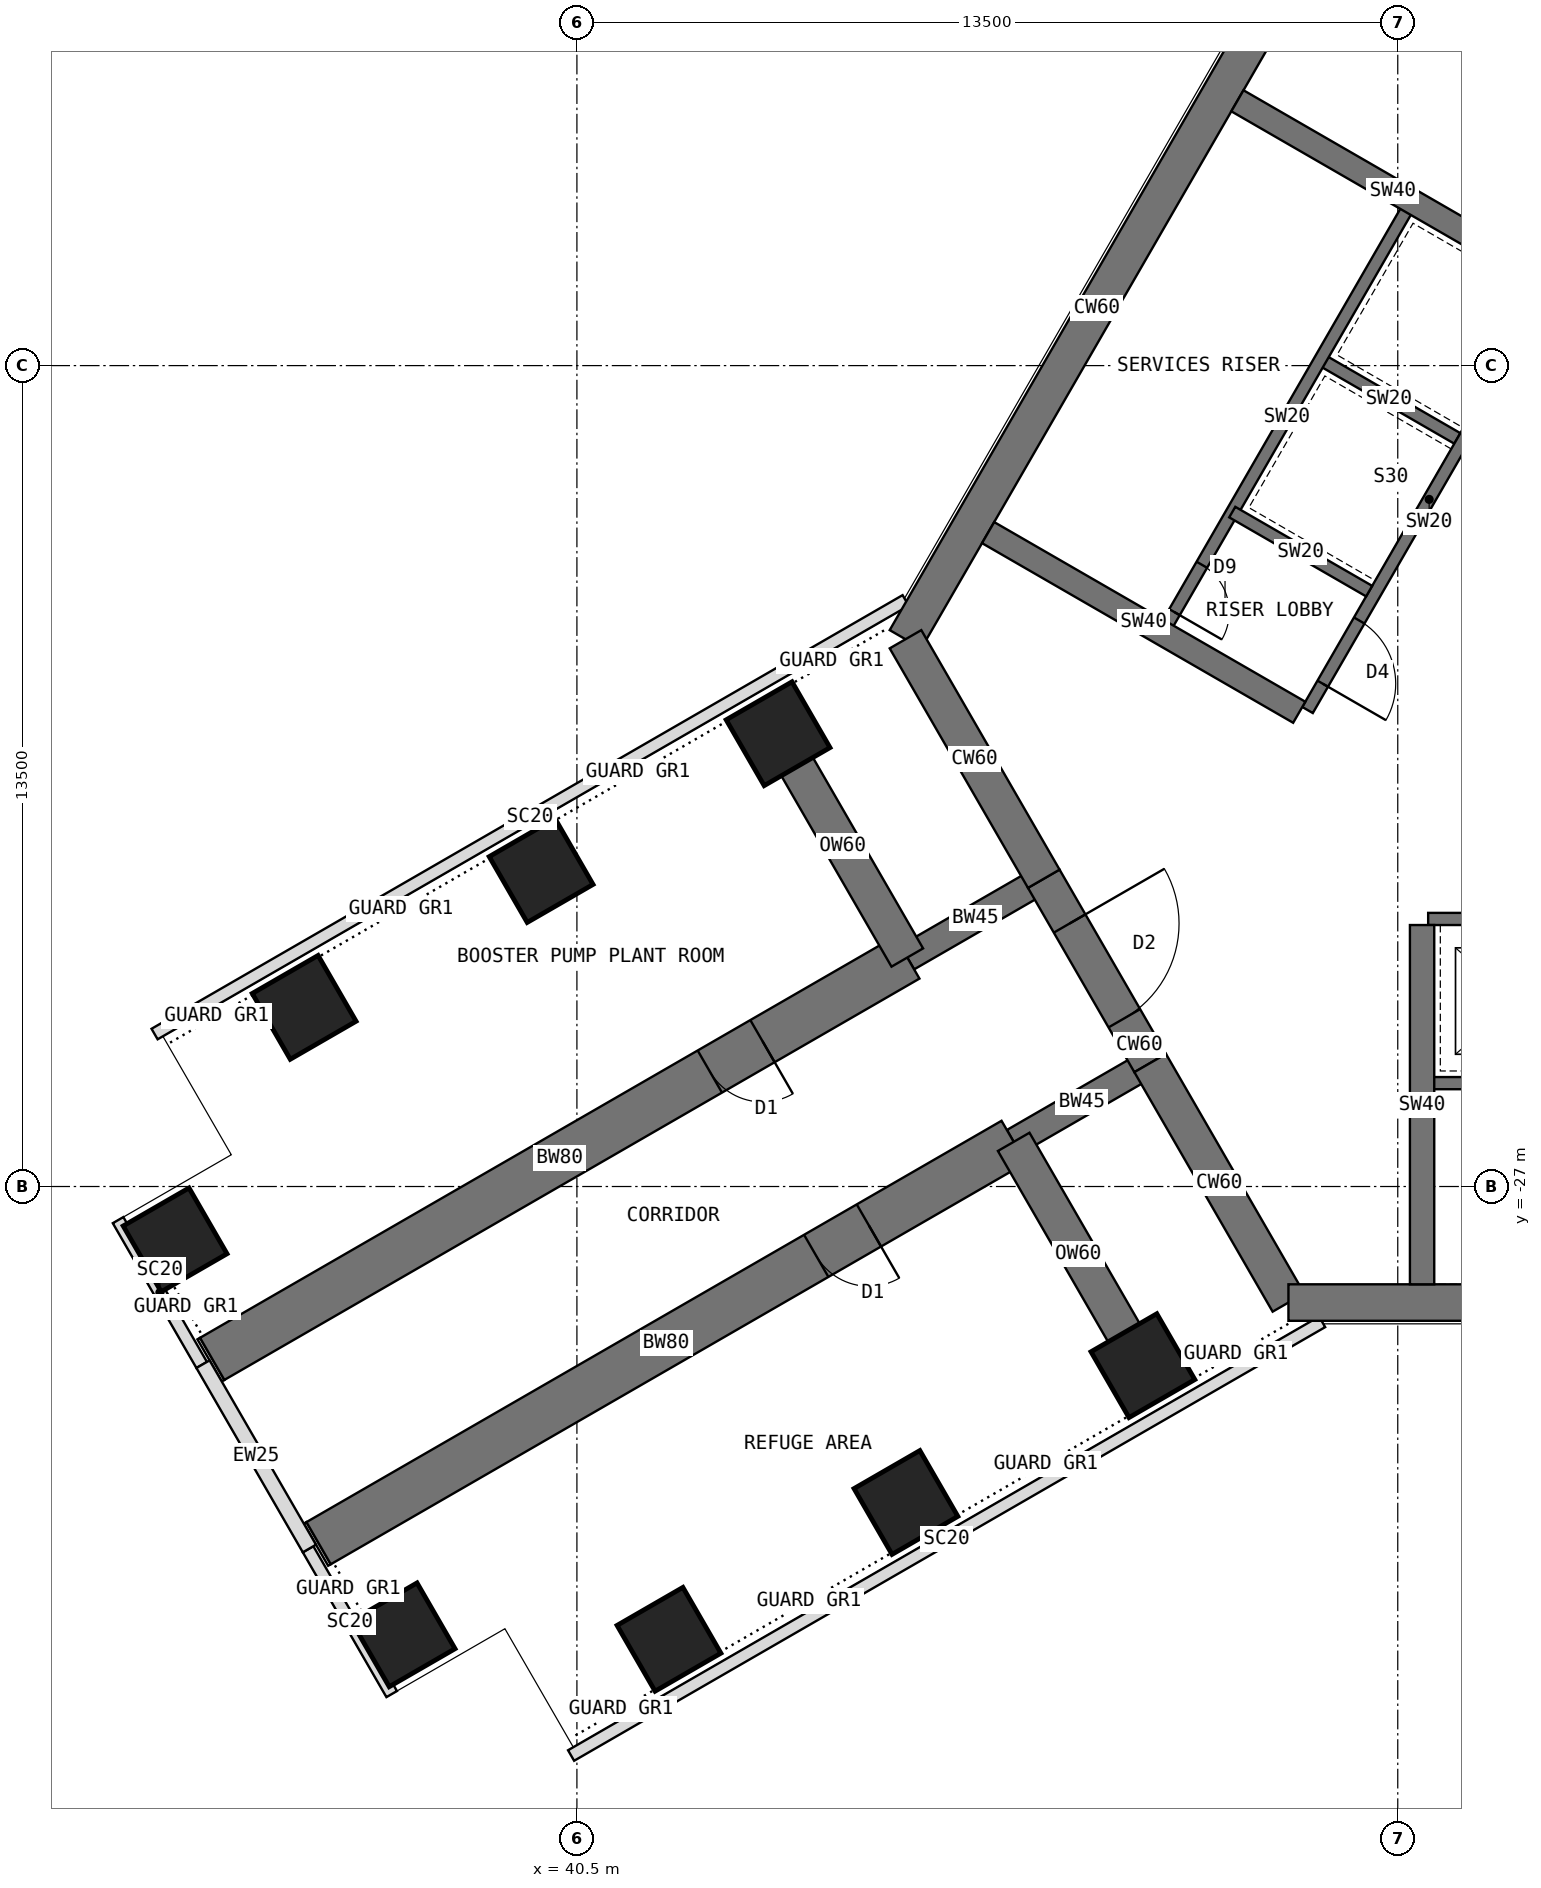
"""IFC4 building model, lengths in metres.
Left out: names, types, materials, properties, quantities, classifications, styles, units other than length and angle.
Written with IfcOpenShell. Run it as: python <this file> out.ifc"""

import sys

from ifc_helpers import new_model, si_unit, direction, frame, frame_2d, origin, origin_2d, place, context, subcontext, project, spatial, rectangle, extrude, element, fill, save


model = new_model("IFC4")
c1 = context("Model", 3, precision=1e-05, world=origin(), true_north=direction((0.0, 1.0)))
c2 = subcontext(c1, "Body", "Model", "MODEL_VIEW")
j1 = project(units=[si_unit("LENGTHUNIT", "METRE"), si_unit("PLANEANGLEUNIT", "RADIAN")], contexts=[c1])
p1 = place(None, origin())
s1 = spatial("IfcSite", under=j1, at=p1, CompositionType="ELEMENT")
p2 = place(p1, origin())
s2 = spatial("IfcBuilding", under=s1, at=p2, CompositionType="ELEMENT")
p3 = place(p2, frame((0.0, 0.0, 165.5)))
s3 = spatial("IfcBuildingStorey", under=s2, at=p3, CompositionType="ELEMENT", Elevation=165.5)
p4 = place(p3, frame((52.202, -7.092, 0.0), z_axis=(0.0, 0.0, 1.0), x_axis=(-0.500005998175, -0.866021940709, 0.0)))
e1 = element("IfcWall", 1, at=p4, inside=s3, PredefinedType="SHEAR", context=c2, shape_type="SweptSolid", body=[
    extrude(rectangle(XDim=12.596, YDim=0.6, at=frame_2d((6.298, 0.0))), origin(), (0.0, 0.0, 1.0), 5.0),
])
p5 = place(p3, frame((45.904, -18.0, 0.0), z_axis=(0.0, 0.0, 1.0), x_axis=(0.500024481964, -0.866011268655, 0.0)))
e2 = element("IfcWall", 2, at=p5, inside=s3, PredefinedType="SHEAR", context=c2, shape_type="SweptSolid", body=[
    extrude(rectangle(XDim=4.548, YDim=0.6, at=frame_2d((2.274, 0.0))), origin(), (0.0, 0.0, 1.0), 5.0),
])
p6 = place(p3, frame((48.178, -21.939, 0.0), z_axis=(0.0, 0.0, 1.0), x_axis=(0.500010275428, -0.866019471182, 0.0)))
e3 = element("IfcWall", 3, at=p6, inside=s3, PredefinedType="SHEAR", context=c2, shape_type="SweptSolid", body=[
    extrude(rectangle(XDim=3.5, YDim=0.6, at=frame_2d((1.75, 0.0))), origin(), (0.0, 0.0, 1.0), 5.0),
])
p7 = place(p6, frame((0.85, 0.0, 0.0)))
e4 = element("IfcOpeningElement", 4, at=p7, cuts=e3, PredefinedType="OPENING", context=c2, shape_type="SweptSolid", body=[
    extrude(rectangle(XDim=1.8, YDim=2.1, at=frame_2d((0.9, 1.05))), frame((0.0, 0.31, 0.0), z_axis=(0.0, -1.0, 0.0), x_axis=(1.0, 0.0, 0.0)), (0.0, 0.0, 1.0), 0.62),
])
p8 = place(p3, frame((49.928, -24.97, 0.0), z_axis=(0.0, 0.0, 1.0), x_axis=(0.499984222037, -0.866034513004, 0.0)))
e5 = element("IfcWall", 5, at=p8, inside=s3, PredefinedType="SHEAR", context=c2, shape_type="SweptSolid", body=[
    extrude(rectangle(XDim=4.548, YDim=0.6, at=frame_2d((2.274, 0.0))), origin(), (0.0, 0.0, 1.0), 5.0),
])
p9 = place(p3, frame((52.202, -28.908, 0.0), z_axis=(0.0, 0.0, 1.0), x_axis=(1.0, 0.0, 0.0)))
e6 = element("IfcWall", 6, at=p9, inside=s3, PredefinedType="SHEAR", context=c2, shape_type="SweptSolid", body=[
    extrude(rectangle(XDim=12.596, YDim=0.6, at=frame_2d((6.298, 0.0))), origin(), (0.0, 0.0, 1.0), 5.0),
])
p10 = place(p3, frame((49.928, -24.97, 0.0), z_axis=(0.0, 0.0, 1.0), x_axis=(-0.866031863473, -0.499988811324, 0.0)))
e7 = element("IfcWall", 7, at=p10, inside=s3, PredefinedType="SHEAR", context=c2, shape_type="SweptSolid", body=[
    extrude(rectangle(XDim=2.592, YDim=0.45, at=frame_2d((1.296, 0.0))), origin(), (0.0, 0.0, 1.0), 5.0),
])
p11 = place(p3, frame((47.684, -26.266, 0.0), z_axis=(0.0, 0.0, 1.0), x_axis=(-0.866027579429, -0.499996231654, 0.0)))
e8 = element("IfcWall", 8, at=p11, inside=s3, PredefinedType="SHEAR", context=c2, shape_type="SweptSolid", body=[
    extrude(rectangle(XDim=13.2, YDim=0.8, at=frame_2d((6.6, 0.0))), origin(), (0.0, 0.0, 1.0), 5.0),
])
p12 = place(p11, frame((2.75, 0.0, 0.0)))
e9 = element("IfcOpeningElement", 9, at=p12, cuts=e8, PredefinedType="OPENING", context=c2, shape_type="SweptSolid", body=[
    extrude(rectangle(XDim=1.0, YDim=2.1, at=frame_2d((0.5, 1.05))), frame((0.0, 0.41, 0.0), z_axis=(0.0, -1.0, 0.0), x_axis=(1.0, 0.0, 0.0)), (0.0, 0.0, 1.0), 0.82),
])
p13 = place(p3, frame((48.178, -21.939, 0.0), z_axis=(0.0, 0.0, 1.0), x_axis=(-0.866072649678, -0.499918158782, 0.0)))
e10 = element("IfcWall", 10, at=p13, inside=s3, PredefinedType="SHEAR", context=c2, shape_type="SweptSolid", body=[
    extrude(rectangle(XDim=2.592, YDim=0.45, at=frame_2d((1.296, 0.0))), origin(), (0.0, 0.0, 1.0), 5.0),
])
p14 = place(p3, frame((45.934, -23.234, 0.0), z_axis=(0.0, 0.0, 1.0), x_axis=(-0.866019570528, -0.500010103361, 0.0)))
e11 = element("IfcWall", 11, at=p14, inside=s3, PredefinedType="SHEAR", context=c2, shape_type="SweptSolid", body=[
    extrude(rectangle(XDim=13.2, YDim=0.8, at=frame_2d((6.6, 0.0))), origin(), (0.0, 0.0, 1.0), 5.0),
])
p15 = place(p14, frame((2.75, 0.0, 0.0)))
e12 = element("IfcOpeningElement", 12, at=p15, cuts=e11, PredefinedType="OPENING", context=c2, shape_type="SweptSolid", body=[
    extrude(rectangle(XDim=1.0, YDim=2.1, at=frame_2d((0.5, 1.05))), frame((0.0, 0.41, 0.0), z_axis=(0.0, -1.0, 0.0), x_axis=(1.0, 0.0, 0.0)), (0.0, 0.0, 1.0), 0.82),
])
for number, where, z_axis, x_axis in (
    (13, (49.809, -29.946, 0.0), (0.0, 0.0, 1.0), (0.866, 0.5, 0.0)),
    (14, (43.809, -19.554, 0.0), (0.0, 0.0, 1.0), (0.866, 0.5, 0.0)),
    (15, (45.912, -32.196, 0.0), (0.0, 0.0, 1.0), (0.866, 0.5, 0.0)),
    (16, (39.912, -21.804, 0.0), (0.0, 0.0, 1.0), (0.866, 0.5, 0.0)),
    (17, (42.014, -34.446, 0.0), (0.0, 0.0, 1.0), (0.866, 0.5, 0.0)),
    (18, (36.014, -24.054, 0.0), (0.0, 0.0, 1.0), (0.866, 0.5, 0.0)),
    (19, (37.642, -34.373, 0.0), (0.0, 0.0, 1.0), (0.866, 0.5, 0.0)),
    (20, (33.892, -27.877, 0.0), (0.0, 0.0, 1.0), (0.866, 0.5, 0.0)),
):
    element("IfcColumn", number, at=place(p3, frame(where, z_axis=z_axis, x_axis=x_axis)), inside=s3, PredefinedType="COLUMN", context=c2, shape_type="SweptSolid", body=[
        extrude(rectangle(XDim=1.25, YDim=1.25, at=origin_2d()), origin(), (0.0, 0.0, 1.0), 5.0),
    ])
for number, where, z_axis, x_axis in (
    (21, (47.684, -26.266, 0.0), (0.0, 0.0, 1.0), (0.5, -0.866, 0.0)),
    (22, (45.934, -23.234, 0.0), (0.0, 0.0, 1.0), (-0.5, 0.866, 0.0)),
):
    element("IfcWall", number, at=place(p3, frame(where, z_axis=z_axis, x_axis=x_axis)), inside=s3, PredefinedType="SHEAR", context=c2, shape_type="SweptSolid", body=[
        extrude(rectangle(XDim=4.25, YDim=0.6, at=frame_2d((2.125, 0.0))), origin(), (0.0, 0.0, 1.0), 5.0),
    ])
for number, where, z_axis, x_axis in (
    (23, (52.756, -29.226, 0.0), (0.0, 0.0, 1.0), (-0.866, -0.5, 0.0)),
    (24, (33.554, -24.493, 0.0), (0.0, 0.0, 1.0), (0.866, 0.5, 0.0)),
):
    element("IfcWall", number, at=place(p3, frame(where, z_axis=z_axis, x_axis=x_axis)), inside=s3, PredefinedType="USERDEFINED", context=c2, shape_type="SweptSolid", body=[
        extrude(rectangle(XDim=14.263, YDim=0.2, at=frame_2d((7.131, 0.0))), origin(), (0.0, 0.0, 1.0), 4.8),
    ])
p16 = place(p3, frame((32.954, -27.553, 0.0), z_axis=(0.0, 0.0, 1.0), x_axis=(0.499996545922, -0.866027397988, 0.0)))
e25 = element("IfcWall", 25, at=p16, inside=s3, PredefinedType="USERDEFINED", context=c2, shape_type="SweptSolid", body=[
    extrude(rectangle(XDim=2.75, YDim=0.2, at=frame_2d((1.375, 0.0))), origin(), (0.0, 0.0, 1.0), 4.8),
])
p17 = place(p3, frame((34.351, -29.922, 0.0), z_axis=(0.0, 0.0, 1.0), x_axis=(0.499980071345, -0.866036909293, 0.0)))
e26 = element("IfcWall", 26, at=p17, inside=s3, PredefinedType="STANDARD", context=c2, shape_type="SweptSolid", body=[
    extrude(rectangle(XDim=3.5, YDim=0.25, at=frame_2d((1.75, 0.0))), origin(), (0.0, 0.0, 1.0), 4.8),
])
p18 = place(p3, frame((36.079, -32.966, 0.0), z_axis=(0.0, 0.0, 1.0), x_axis=(0.499996545922, -0.866027397988, 0.0)))
e27 = element("IfcWall", 27, at=p18, inside=s3, PredefinedType="USERDEFINED", context=c2, shape_type="SweptSolid", body=[
    extrude(rectangle(XDim=2.75, YDim=0.2, at=frame_2d((1.375, 0.0))), origin(), (0.0, 0.0, 1.0), 4.8),
])
p19 = place(p3, frame((36.252, -32.865, 0.0), z_axis=(0.0, 0.0, 1.0), x_axis=(-0.86553723574, -0.500844580232, 0.0)))
e28 = element("IfcWall", 28, at=p19, inside=s3, PredefinedType="PARTITIONING", context=c2, shape_type="SweptSolid", body=[
    extrude(rectangle(XDim=0.05, YDim=0.8, at=frame_2d((0.025, 0.0))), origin(), (0.0, 0.0, 1.0), 4.8),
])
p20 = place(p3, frame((34.502, -29.834, 0.0), z_axis=(0.0, 0.0, 1.0), x_axis=(-0.867642581652, -0.497188445666, 0.0)))
e29 = element("IfcWall", 29, at=p20, inside=s3, PredefinedType="PARTITIONING", context=c2, shape_type="SweptSolid", body=[
    extrude(rectangle(XDim=0.05, YDim=0.8, at=frame_2d((0.025, 0.0))), origin(), (0.0, 0.0, 1.0), 4.8),
])
p21 = place(p3, frame((56.516, -12.236, 0.0), z_axis=(0.0, 0.0, 1.0), x_axis=(-0.49999894854, -0.866026010844, 0.0)))
e30 = element("IfcWall", 30, at=p21, inside=s3, PredefinedType="SHEAR", context=c2, shape_type="SweptSolid", body=[
    extrude(rectangle(XDim=8.0, YDim=0.2, at=frame_2d((4.0, 0.0))), origin(), (0.0, 0.0, 1.0), 5.0),
])
p22 = place(p21, frame((6.3, 0.0, 0.0)))
e31 = element("IfcOpeningElement", 31, at=p22, cuts=e30, PredefinedType="OPENING", context=c2, shape_type="SweptSolid", body=[
    extrude(rectangle(XDim=1.2, YDim=2.1, at=frame_2d((0.6, 1.05))), frame((0.0, 0.11, 0.0), z_axis=(0.0, -1.0, 0.0), x_axis=(1.0, 0.0, 0.0)), (0.0, 0.0, 1.0), 0.22),
])
for number, where, z_axis, x_axis in (
    (32, (54.98, -14.697, 0.0), (0.0, 0.0, 1.0), (-0.866, 0.5, 0.0)),
    (33, (53.53, -17.209, 0.0), (0.0, 0.0, 1.0), (-0.866, 0.5, 0.0)),
):
    element("IfcWall", number, at=place(p3, frame(where, z_axis=z_axis, x_axis=x_axis)), inside=s3, PredefinedType="SHEAR", context=c2, shape_type="SweptSolid", body=[
        extrude(rectangle(XDim=2.6, YDim=0.2, at=frame_2d((1.3, 0.0))), origin(), (0.0, 0.0, 1.0), 5.0),
    ])
p23 = place(p3, frame((54.178, -10.886, 0.0), z_axis=(0.0, 0.0, 1.0), x_axis=(-0.49999894854, -0.866026010844, 0.0)))
e34 = element("IfcWall", 34, at=p23, inside=s3, PredefinedType="SHEAR", context=c2, shape_type="SweptSolid", body=[
    extrude(rectangle(XDim=8.0, YDim=0.2, at=frame_2d((4.0, 0.0))), origin(), (0.0, 0.0, 1.0), 5.0),
])
p24 = place(p23, frame((6.8, 0.0, 0.0)))
e35 = element("IfcOpeningElement", 35, at=p24, cuts=e34, PredefinedType="OPENING", context=c2, shape_type="SweptSolid", body=[
    extrude(rectangle(XDim=0.9, YDim=2.1, at=frame_2d((0.45, 1.05))), frame((0.0, 0.11, 0.0), z_axis=(0.0, -1.0, 0.0), x_axis=(1.0, 0.0, 0.0)), (0.0, 0.0, 1.0), 0.22),
])
p25 = place(p3, frame((52.38, -19.201, 0.0), z_axis=(0.0, 0.0, 1.0), x_axis=(-0.866027317282, 0.49999668571, 0.0)))
e36 = element("IfcWall", 36, at=p25, inside=s3, PredefinedType="SHEAR", context=c2, shape_type="SweptSolid", body=[
    extrude(rectangle(XDim=5.908, YDim=0.4, at=frame_2d((2.954, 0.0))), origin(), (0.0, 0.0, 1.0), 5.0),
])
p26 = place(p3, frame((56.48, -12.099, 0.0), z_axis=(0.0, 0.0, 1.0), x_axis=(-0.866009424208, 0.500027676417, 0.0)))
e37 = element("IfcWall", 37, at=p26, inside=s3, PredefinedType="SHEAR", context=c2, shape_type="SweptSolid", body=[
    extrude(rectangle(XDim=5.908, YDim=0.4, at=frame_2d((2.954, 0.0))), origin(), (0.0, 0.0, 1.0), 5.0),
])
p27 = place(p3, frame((54.5, -22.6, 0.0), z_axis=(0.0, 0.0, 1.0), x_axis=(1.0, 0.0, 0.0)))
e38 = element("IfcWall", 38, at=p27, inside=s3, PredefinedType="SHEAR", context=c2, shape_type="SweptSolid", body=[
    extrude(rectangle(XDim=8.0, YDim=0.2, at=frame_2d((4.0, 0.0))), origin(), (0.0, 0.0, 1.0), 5.0),
])
p28 = place(p27, frame((6.3, 0.0, 0.0)))
e39 = element("IfcOpeningElement", 39, at=p28, cuts=e38, PredefinedType="OPENING", context=c2, shape_type="SweptSolid", body=[
    extrude(rectangle(XDim=1.2, YDim=2.1, at=frame_2d((0.6, 1.05))), frame((0.0, 0.11, 0.0), z_axis=(0.0, -1.0, 0.0), x_axis=(1.0, 0.0, 0.0)), (0.0, 0.0, 1.0), 0.22),
])
p29 = place(p27, frame((0.9, 0.0, 0.0)))
e40 = element("IfcOpeningElement", 40, at=p29, cuts=e38, PredefinedType="OPENING", context=c2, shape_type="SweptSolid", body=[
    extrude(rectangle(XDim=1.1, YDim=2.2, at=frame_2d((0.55, 1.1))), frame((0.0, 0.11, 0.0), z_axis=(0.0, -1.0, 0.0), x_axis=(1.0, 0.0, 0.0)), (0.0, 0.0, 1.0), 0.22),
])
p30 = place(p3, frame((54.5, -25.3, 0.0), z_axis=(0.0, 0.0, 1.0), x_axis=(1.0, 0.0, 0.0)))
e41 = element("IfcWall", 41, at=p30, inside=s3, PredefinedType="SHEAR", context=c2, shape_type="SweptSolid", body=[
    extrude(rectangle(XDim=8.0, YDim=0.2, at=frame_2d((4.0, 0.0))), origin(), (0.0, 0.0, 1.0), 5.0),
])
p31 = place(p30, frame((6.7, 0.0, 0.0)))
e42 = element("IfcOpeningElement", 42, at=p31, cuts=e41, PredefinedType="OPENING", context=c2, shape_type="SweptSolid", body=[
    extrude(rectangle(XDim=1.1, YDim=2.1, at=frame_2d((0.55, 1.05))), frame((0.0, 0.11, 0.0), z_axis=(0.0, -1.0, 0.0), x_axis=(1.0, 0.0, 0.0)), (0.0, 0.0, 1.0), 0.22),
])
p32 = place(p3, frame((54.4, -22.7, 0.0), z_axis=(0.0, 0.0, 1.0), x_axis=(0.0, -1.0, 0.0)))
e43 = element("IfcWall", 43, at=p32, inside=s3, PredefinedType="SHEAR", context=c2, shape_type="SweptSolid", body=[
    extrude(rectangle(XDim=5.908, YDim=0.4, at=frame_2d((2.954, 0.0))), origin(), (0.0, 0.0, 1.0), 5.0),
])
p33 = place(p22, origin())
e44 = element("IfcDoor", 44, at=p33, inside=s3, OperationType="SINGLE_SWING_RIGHT", PredefinedType="DOOR", context=c2, shape_type="SweptSolid", body=[
    extrude(rectangle(XDim=1.2, YDim=2.1, at=frame_2d((0.6, 1.05))), frame((0.0, 0.025, 0.0), z_axis=(0.0, -1.0, 0.0), x_axis=(1.0, 0.0, 0.0)), (0.0, 0.0, 1.0), 0.05),
])
fill(e31, e44)
p34 = place(p24, origin())
e45 = element("IfcDoor", 45, at=p34, inside=s3, OperationType="SINGLE_SWING_RIGHT", PredefinedType="DOOR", context=c2, shape_type="SweptSolid", body=[
    extrude(rectangle(XDim=0.9, YDim=2.1, at=frame_2d((0.45, 1.05))), frame((0.0, 0.025, 0.0), z_axis=(0.0, -1.0, 0.0), x_axis=(1.0, 0.0, 0.0)), (0.0, 0.0, 1.0), 0.05),
])
fill(e35, e45)
p35 = place(p7, origin())
e46 = element("IfcDoor", 46, at=p35, inside=s3, OperationType="DOUBLE_DOOR_DOUBLE_SWING", PredefinedType="DOOR", context=c2, shape_type="SweptSolid", body=[
    extrude(rectangle(XDim=1.72, YDim=2.06, at=frame_2d((0.9, 1.03))), frame((0.0, 0.025, 0.0), z_axis=(0.0, -1.0, 0.0), x_axis=(1.0, 0.0, 0.0)), (0.0, 0.0, 1.0), 0.05),
    extrude(rectangle(XDim=0.04, YDim=2.1, at=frame_2d((0.02, 1.05))), frame((0.0, 0.3, 0.0), z_axis=(0.0, -1.0, 0.0), x_axis=(1.0, 0.0, 0.0)), (0.0, 0.0, 1.0), 0.6),
    extrude(rectangle(XDim=0.04, YDim=2.1, at=frame_2d((1.78, 1.05))), frame((0.0, 0.3, 0.0), z_axis=(0.0, -1.0, 0.0), x_axis=(1.0, 0.0, 0.0)), (0.0, 0.0, 1.0), 0.6),
    extrude(rectangle(XDim=1.72, YDim=0.04, at=frame_2d((0.9, 2.08))), frame((0.0, 0.3, 0.0), z_axis=(0.0, -1.0, 0.0), x_axis=(1.0, 0.0, 0.0)), (0.0, 0.0, 1.0), 0.6),
])
fill(e4, e46)
p36 = place(p12, origin())
e47 = element("IfcDoor", 47, at=p36, inside=s3, OperationType="SINGLE_SWING_LEFT", PredefinedType="DOOR", context=c2, shape_type="SweptSolid", body=[
    extrude(rectangle(XDim=0.92, YDim=2.06, at=frame_2d((0.5, 1.03))), frame((0.0, 0.025, 0.0), z_axis=(0.0, -1.0, 0.0), x_axis=(1.0, 0.0, 0.0)), (0.0, 0.0, 1.0), 0.05),
    extrude(rectangle(XDim=0.04, YDim=2.1, at=frame_2d((0.02, 1.05))), frame((0.0, 0.4, 0.0), z_axis=(0.0, -1.0, 0.0), x_axis=(1.0, 0.0, 0.0)), (0.0, 0.0, 1.0), 0.8),
    extrude(rectangle(XDim=0.04, YDim=2.1, at=frame_2d((0.98, 1.05))), frame((0.0, 0.4, 0.0), z_axis=(0.0, -1.0, 0.0), x_axis=(1.0, 0.0, 0.0)), (0.0, 0.0, 1.0), 0.8),
    extrude(rectangle(XDim=0.92, YDim=0.04, at=frame_2d((0.5, 2.08))), frame((0.0, 0.4, 0.0), z_axis=(0.0, -1.0, 0.0), x_axis=(1.0, 0.0, 0.0)), (0.0, 0.0, 1.0), 0.8),
])
fill(e9, e47)
p37 = place(p15, origin())
e48 = element("IfcDoor", 48, at=p37, inside=s3, OperationType="SINGLE_SWING_LEFT", PredefinedType="DOOR", context=c2, shape_type="SweptSolid", body=[
    extrude(rectangle(XDim=0.92, YDim=2.06, at=frame_2d((0.5, 1.03))), frame((0.0, 0.025, 0.0), z_axis=(0.0, -1.0, 0.0), x_axis=(1.0, 0.0, 0.0)), (0.0, 0.0, 1.0), 0.05),
    extrude(rectangle(XDim=0.04, YDim=2.1, at=frame_2d((0.02, 1.05))), frame((0.0, 0.4, 0.0), z_axis=(0.0, -1.0, 0.0), x_axis=(1.0, 0.0, 0.0)), (0.0, 0.0, 1.0), 0.8),
    extrude(rectangle(XDim=0.04, YDim=2.1, at=frame_2d((0.98, 1.05))), frame((0.0, 0.4, 0.0), z_axis=(0.0, -1.0, 0.0), x_axis=(1.0, 0.0, 0.0)), (0.0, 0.0, 1.0), 0.8),
    extrude(rectangle(XDim=0.92, YDim=0.04, at=frame_2d((0.5, 2.08))), frame((0.0, 0.4, 0.0), z_axis=(0.0, -1.0, 0.0), x_axis=(1.0, 0.0, 0.0)), (0.0, 0.0, 1.0), 0.8),
])
fill(e12, e48)
save(model, sys.argv[1])
